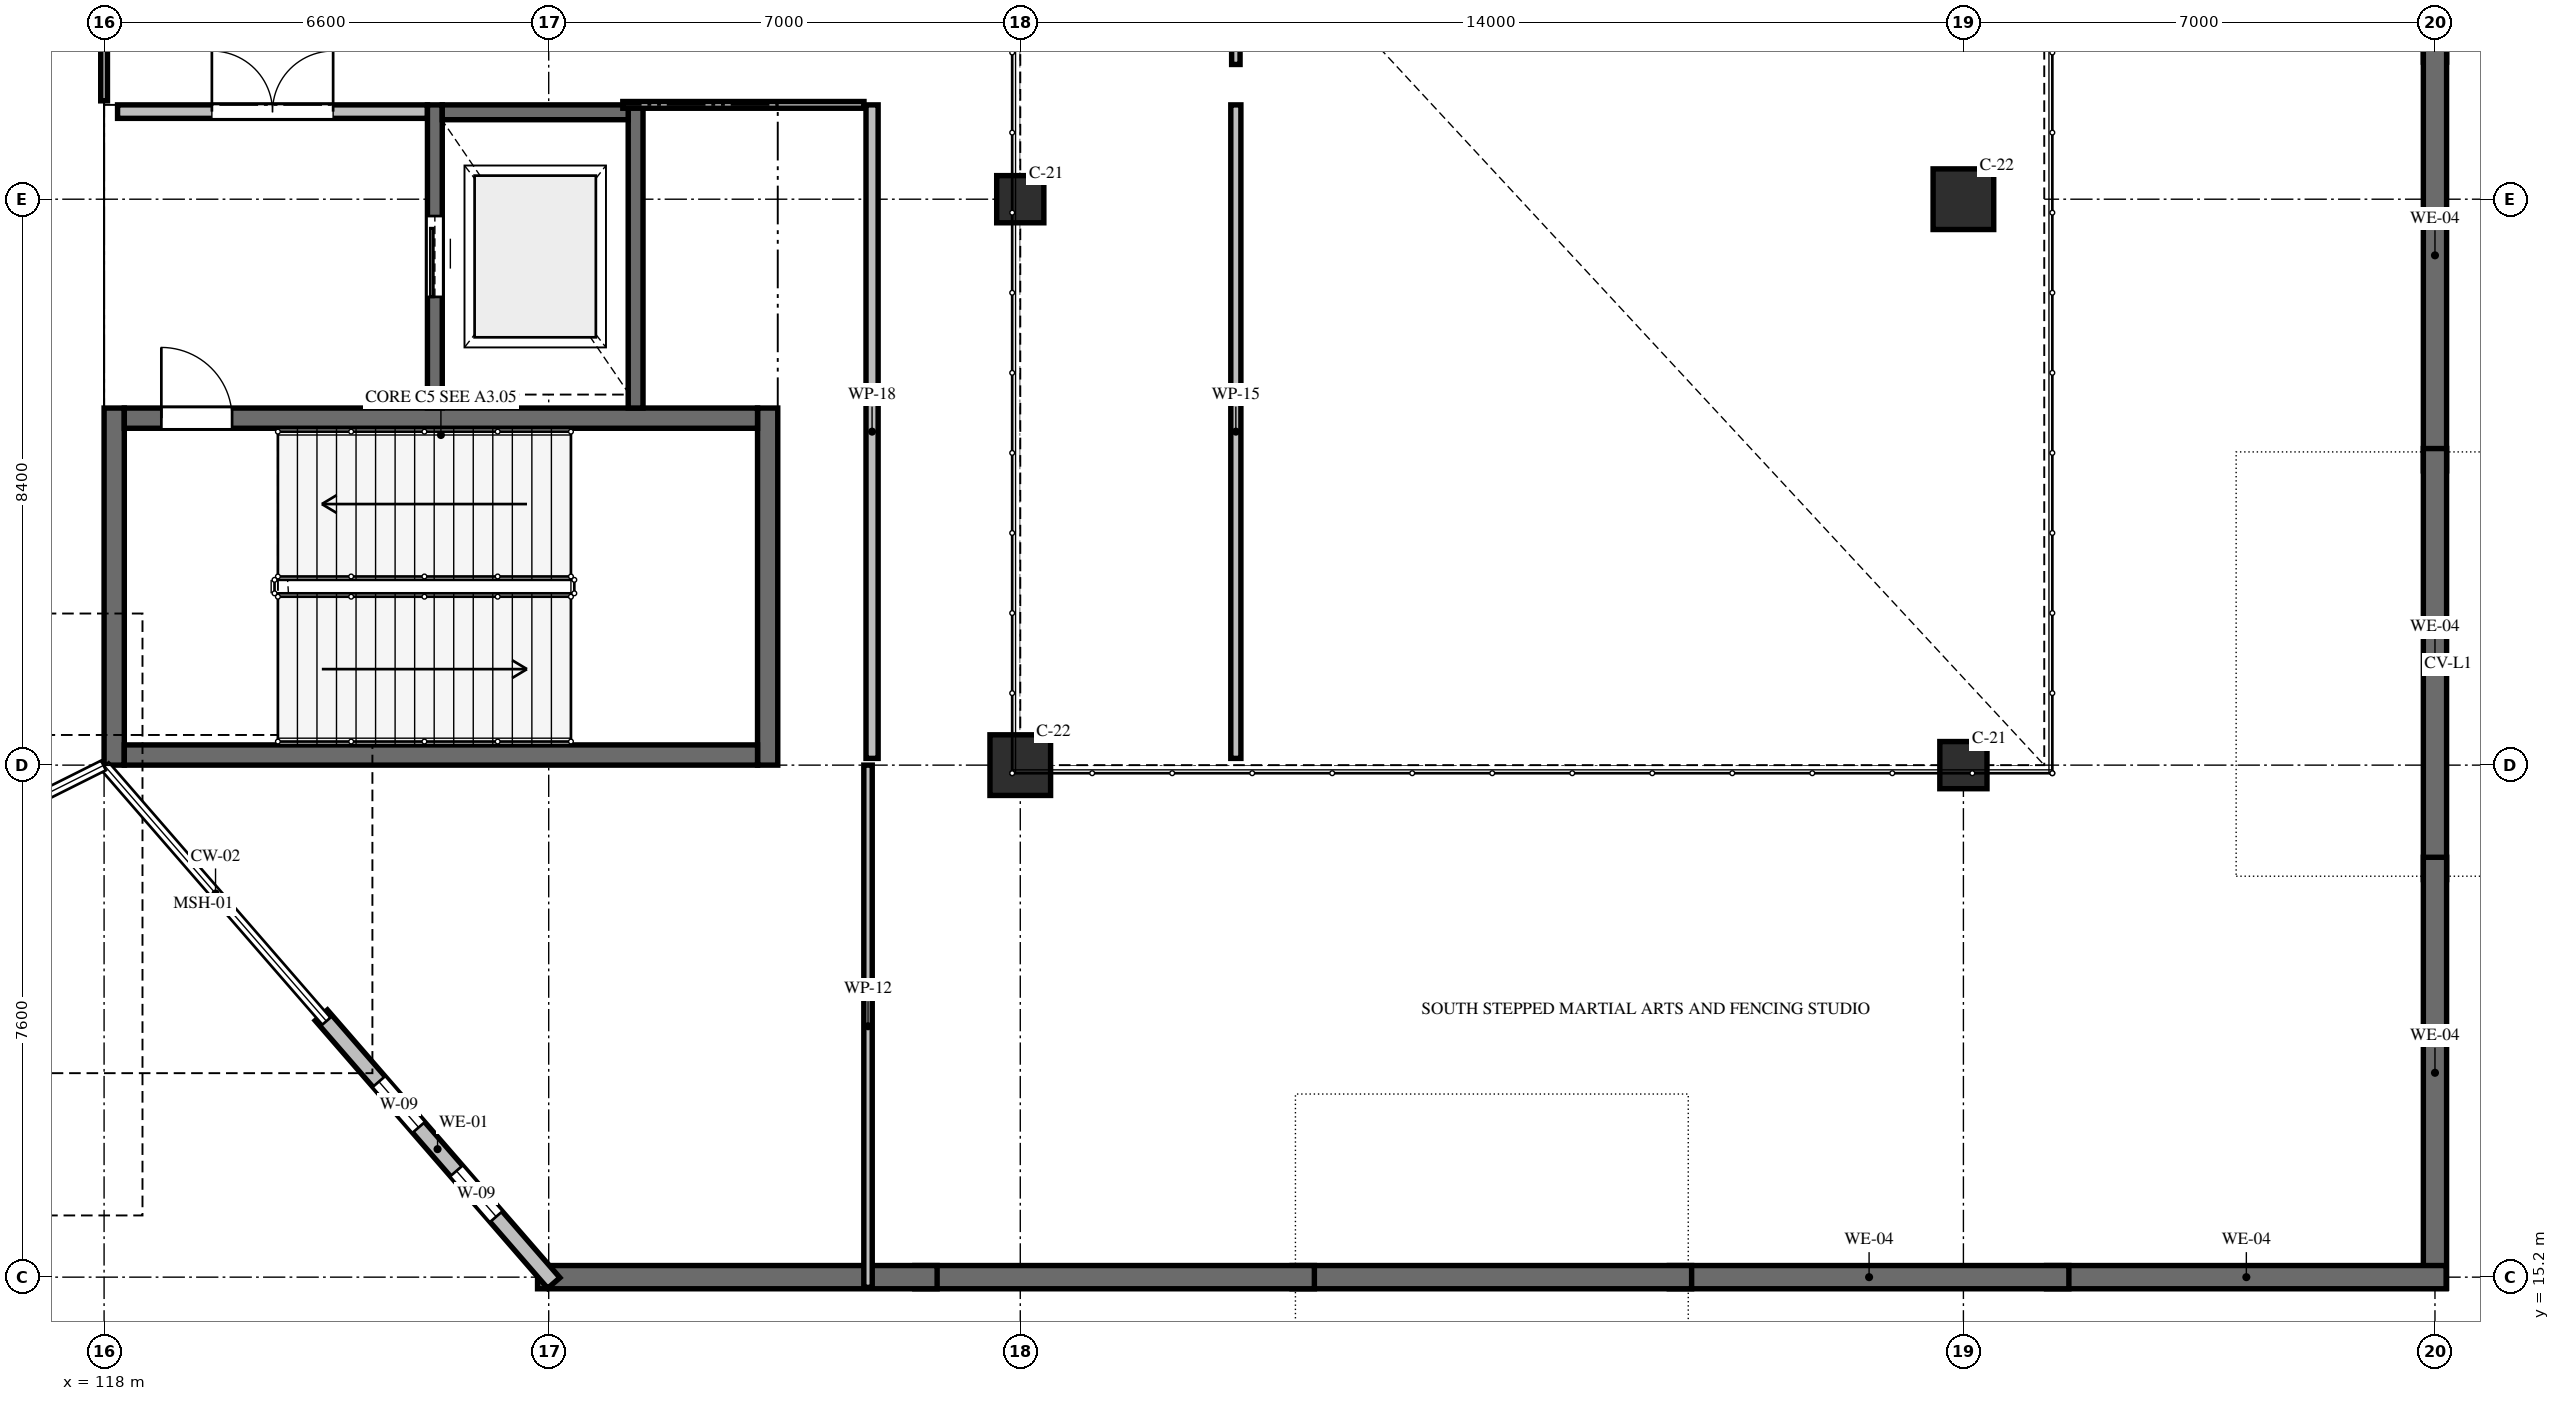
"""IFC4 building model, lengths in metres.
Left out: names, types, materials, properties, quantities, classifications, styles, units other than length and angle.
Written with IfcOpenShell. Run it as: python <this file> out.ifc"""

import sys

from ifc_helpers import new_model, si_unit, direction, frame, frame_2d, origin, origin_2d, place, context, subcontext, project, spatial, rectangle, hollow_rectangle, extrude, element, fill, save


model = new_model("IFC4")
c1 = context("Model", 3, precision=1e-05, world=origin(), true_north=direction((0.0, 1.0)))
c2 = subcontext(c1, "Body", "Model", "MODEL_VIEW")
j1 = project(units=[si_unit("LENGTHUNIT", "METRE"), si_unit("PLANEANGLEUNIT", "RADIAN")], contexts=[c1])
p1 = place(None, origin())
s1 = spatial("IfcSite", under=j1, at=p1, CompositionType="ELEMENT")
p2 = place(p1, origin())
s2 = spatial("IfcBuilding", under=s1, at=p2, CompositionType="ELEMENT")
p3 = place(p2, frame((0.0, 0.0, 5.4)))
s3 = spatial("IfcBuildingStorey", under=s2, at=p3, CompositionType="ELEMENT", Elevation=5.4)
p4 = place(p3, frame((131.6, 22.8, 0.0), z_axis=(0.0, 0.0, 1.0), x_axis=(1.0, 0.0, 0.0)))
e1 = element("IfcColumn", 1, at=p4, inside=s3, PredefinedType="COLUMN", context=c2, shape_type="SweptSolid", body=[
    extrude(hollow_rectangle(XDim=0.9, YDim=0.9, WallThickness=0.036, InnerFilletRadius=0.036, OuterFilletRadius=0.072, at=origin_2d()), origin(), (0.0, 0.0, 1.0), 5.4),
])
for number, where, z_axis, x_axis in (
    (2, (131.6, 31.2, 0.0), (0.0, 0.0, 1.0), (1.0, 0.0, 0.0)),
    (3, (145.6, 22.8, 0.0), (0.0, 0.0, 1.0), (1.0, 0.0, 0.0)),
):
    element("IfcColumn", number, at=place(p3, frame(where, z_axis=z_axis, x_axis=x_axis)), inside=s3, PredefinedType="COLUMN", context=c2, shape_type="SweptSolid", body=[
        extrude(hollow_rectangle(XDim=0.7, YDim=0.7, WallThickness=0.028, InnerFilletRadius=0.028, OuterFilletRadius=0.056, at=origin_2d()), origin(), (0.0, 0.0, 1.0), 5.4),
    ])
p5 = place(p3, frame((145.6, 31.2, 0.0), z_axis=(0.0, 0.0, 1.0), x_axis=(1.0, 0.0, 0.0)))
e4 = element("IfcColumn", 4, at=p5, inside=s3, PredefinedType="COLUMN", context=c2, shape_type="SweptSolid", body=[
    extrude(hollow_rectangle(XDim=0.9, YDim=0.9, WallThickness=0.036, InnerFilletRadius=0.036, OuterFilletRadius=0.072, at=origin_2d()), origin(), (0.0, 0.0, 1.0), 5.4),
])
p6 = place(p3, frame((152.6, 39.632, 0.0), z_axis=(0.0, 0.0, 1.0), x_axis=(0.0, -1.0, 0.0)))
e5 = element("IfcWall", 5, at=p6, inside=s3, PredefinedType="SOLIDWALL", context=c2, shape_type="SweptSolid", body=[
    extrude(rectangle(XDim=6.398, YDim=0.345, at=frame_2d((3.199, 0.0))), origin(), (0.0, 0.0, 1.0), 4.748),
])
p7 = place(p6, frame((1.233, 0.0, 0.9)))
e6 = element("IfcOpeningElement", 6, at=p7, cuts=e5, PredefinedType="OPENING", context=c2, shape_type="SweptSolid", body=[
    extrude(rectangle(XDim=1.8, YDim=1.35, at=frame_2d((0.9, 0.675))), frame((0.0, 0.182, 0.0), z_axis=(0.0, -1.0, 0.0), x_axis=(1.0, 0.0, 0.0)), (0.0, 0.0, 1.0), 0.365),
])
p8 = place(p6, frame((3.365, 0.0, 0.9)))
e7 = element("IfcOpeningElement", 7, at=p8, cuts=e5, PredefinedType="OPENING", context=c2, shape_type="SweptSolid", body=[
    extrude(rectangle(XDim=1.8, YDim=1.35, at=frame_2d((0.9, 0.675))), frame((0.0, 0.182, 0.0), z_axis=(0.0, -1.0, 0.0), x_axis=(1.0, 0.0, 0.0)), (0.0, 0.0, 1.0), 0.365),
])
p9 = place(p3, frame((152.6, 33.566, 0.0), z_axis=(0.0, 0.0, 1.0), x_axis=(0.0, -1.0, 0.0)))
e8 = element("IfcWall", 8, at=p9, inside=s3, PredefinedType="SOLIDWALL", context=c2, shape_type="SweptSolid", body=[
    extrude(rectangle(XDim=6.398, YDim=0.345, at=frame_2d((3.199, 0.0))), origin(), (0.0, 0.0, 1.0), 4.738),
])
p10 = place(p3, frame((152.6, 27.499, 0.0), z_axis=(0.0, 0.0, 1.0), x_axis=(0.0, -1.0, 0.0)))
e9 = element("IfcWall", 9, at=p10, inside=s3, PredefinedType="SOLIDWALL", context=c2, shape_type="SweptSolid", body=[
    extrude(rectangle(XDim=6.398, YDim=0.345, at=frame_2d((3.199, 0.0))), origin(), (0.0, 0.0, 1.0), 4.748),
])
p11 = place(p3, frame((152.6, 21.432, 0.0), z_axis=(0.0, 0.0, 1.0), x_axis=(0.0, -1.0, 0.0)))
e10 = element("IfcWall", 10, at=p11, inside=s3, PredefinedType="SOLIDWALL", context=c2, shape_type="SweptSolid", body=[
    extrude(rectangle(XDim=6.398, YDim=0.345, at=frame_2d((3.199, 0.0))), origin(), (0.0, 0.0, 1.0), 4.55),
])
for number, where, z_axis, x_axis in (
    (11, (152.766, 15.2, 0.0), (0.0, 0.0, 1.0), (-1.0, 0.0, 0.0)),
    (12, (147.166, 15.2, 0.0), (0.0, 0.0, 1.0), (-1.0, 0.0, 0.0)),
    (13, (141.566, 15.2, 0.0), (0.0, 0.0, 1.0), (-1.0, 0.0, 0.0)),
    (14, (135.966, 15.2, 0.0), (0.0, 0.0, 1.0), (-1.0, 0.0, 0.0)),
    (15, (130.365, 15.2, 0.0), (0.0, 0.0, 1.0), (-1.0, 0.0, 0.0)),
):
    element("IfcWall", number, at=place(p3, frame(where, z_axis=z_axis, x_axis=x_axis)), inside=s3, PredefinedType="SOLIDWALL", context=c2, shape_type="SweptSolid", body=[
        extrude(rectangle(XDim=5.931, YDim=0.345, at=frame_2d((2.966, 0.0))), origin(), (0.0, 0.0, 1.0), 4.55),
    ])
p12 = place(p3, frame((124.676, 15.113, 0.0), z_axis=(0.0, 0.0, 1.0), x_axis=(-0.655679000565, 0.755039765985, 0.0)))
e16 = element("IfcWall", 16, at=p12, inside=s3, PredefinedType="SOLIDWALL", context=c2, shape_type="SweptSolid", body=[
    extrude(rectangle(XDim=5.263, YDim=0.24, at=frame_2d((2.632, 0.0))), origin(), (0.0, 0.0, 1.0), 5.1),
])
p13 = place(p12, frame((1.304, 0.0, 0.9)))
e17 = element("IfcOpeningElement", 17, at=p13, cuts=e16, PredefinedType="OPENING", context=c2, shape_type="SweptSolid", body=[
    extrude(rectangle(XDim=0.9, YDim=1.2, at=frame_2d((0.45, 0.6))), frame((0.0, 0.13, 0.0), z_axis=(0.0, -1.0, 0.0), x_axis=(1.0, 0.0, 0.0)), (0.0, 0.0, 1.0), 0.26),
])
p14 = place(p12, frame((3.059, 0.0, 0.9)))
e18 = element("IfcOpeningElement", 18, at=p14, cuts=e16, PredefinedType="OPENING", context=c2, shape_type="SweptSolid", body=[
    extrude(rectangle(XDim=0.9, YDim=1.2, at=frame_2d((0.45, 0.6))), frame((0.0, 0.13, 0.0), z_axis=(0.0, -1.0, 0.0), x_axis=(1.0, 0.0, 0.0)), (0.0, 0.0, 1.0), 0.26),
])
for number, where, z_axis, x_axis in (
    (19, (118.15, 22.8, 0.0), (0.0, 0.0, 1.0), (0.0, 1.0, 0.0)),
    (20, (127.85, 28.1, 0.0), (0.0, 0.0, 1.0), (0.0, -1.0, 0.0)),
):
    element("IfcWall", number, at=place(p3, frame(where, z_axis=z_axis, x_axis=x_axis)), inside=s3, PredefinedType="SHEAR", context=c2, shape_type="SweptSolid", body=[
        extrude(rectangle(XDim=5.3, YDim=0.3, at=frame_2d((2.65, 0.0))), origin(), (0.0, 0.0, 1.0), 5.15),
    ])
p15 = place(p3, frame((127.7, 22.95, 0.0), z_axis=(0.0, 0.0, 1.0), x_axis=(-1.0, 0.0, 0.0)))
e21 = element("IfcWall", 21, at=p15, inside=s3, PredefinedType="SHEAR", context=c2, shape_type="SweptSolid", body=[
    extrude(rectangle(XDim=9.4, YDim=0.3, at=frame_2d((4.7, 0.0))), origin(), (0.0, 0.0, 1.0), 5.15),
])
p16 = place(p3, frame((118.3, 27.95, 0.0), z_axis=(0.0, 0.0, 1.0), x_axis=(1.0, 0.0, 0.0)))
e22 = element("IfcWall", 22, at=p16, inside=s3, PredefinedType="SHEAR", context=c2, shape_type="SweptSolid", body=[
    extrude(rectangle(XDim=9.4, YDim=0.3, at=frame_2d((4.7, 0.0))), origin(), (0.0, 0.0, 1.0), 5.15),
])
p17 = place(p16, frame((0.55, 0.0, 0.0)))
e23 = element("IfcOpeningElement", 23, at=p17, cuts=e22, PredefinedType="OPENING", context=c2, shape_type="SweptSolid", body=[
    extrude(rectangle(XDim=1.05, YDim=2.2, at=frame_2d((0.525, 1.1))), frame((0.0, 0.16, 0.0), z_axis=(0.0, -1.0, 0.0), x_axis=(1.0, 0.0, 0.0)), (0.0, 0.0, 1.0), 0.32),
])
p18 = place(p3, frame((118.2, 32.5, 0.0), z_axis=(0.0, 0.0, 1.0), x_axis=(1.0, 0.0, 0.0)))
e24 = element("IfcWall", 24, at=p18, inside=s3, PredefinedType="SOLIDWALL", context=c2, shape_type="SweptSolid", body=[
    extrude(rectangle(XDim=4.6, YDim=0.2, at=frame_2d((2.3, 0.0))), origin(), (0.0, 0.0, 1.0), 4.552),
])
p19 = place(p18, frame((1.4, 0.0, 0.0)))
e25 = element("IfcOpeningElement", 25, at=p19, cuts=e24, PredefinedType="OPENING", context=c2, shape_type="SweptSolid", body=[
    extrude(rectangle(XDim=1.8, YDim=2.2, at=frame_2d((0.9, 1.1))), frame((0.0, 0.11, 0.0), z_axis=(0.0, -1.0, 0.0), x_axis=(1.0, 0.0, 0.0)), (0.0, 0.0, 1.0), 0.22),
])
p20 = place(p3, frame((122.91, 28.1, 0.0), z_axis=(0.0, 0.0, 1.0), x_axis=(0.0, 1.0, 0.0)))
e26 = element("IfcWall", 26, at=p20, inside=s3, PredefinedType="SOLIDWALL", context=c2, shape_type="SweptSolid", body=[
    extrude(rectangle(XDim=4.5, YDim=0.22, at=frame_2d((2.25, 0.0))), origin(), (0.0, 0.0, 1.0), 5.15),
])
p21 = place(p20, frame((1.65, 0.0, 0.0)))
e27 = element("IfcOpeningElement", 27, at=p21, cuts=e26, PredefinedType="OPENING", context=c2, shape_type="SweptSolid", body=[
    extrude(rectangle(XDim=1.2, YDim=2.2, at=frame_2d((0.6, 1.1))), frame((0.0, 0.12, 0.0), z_axis=(0.0, -1.0, 0.0), x_axis=(1.0, 0.0, 0.0)), (0.0, 0.0, 1.0), 0.24),
])
p22 = place(p3, frame((125.89, 28.1, 0.0), z_axis=(0.0, 0.0, 1.0), x_axis=(0.0, 1.0, 0.0)))
e28 = element("IfcWall", 28, at=p22, inside=s3, PredefinedType="SOLIDWALL", context=c2, shape_type="SweptSolid", body=[
    extrude(rectangle(XDim=4.5, YDim=0.22, at=frame_2d((2.25, 0.0))), origin(), (0.0, 0.0, 1.0), 5.15),
])
p23 = place(p3, frame((123.02, 32.49, 0.0), z_axis=(0.0, 0.0, 1.0), x_axis=(1.0, 0.0, 0.0)))
e29 = element("IfcWall", 29, at=p23, inside=s3, PredefinedType="SOLIDWALL", context=c2, shape_type="SweptSolid", body=[
    extrude(rectangle(XDim=2.76, YDim=0.22, at=frame_2d((1.38, 0.0))), origin(), (0.0, 0.0, 1.0), 5.15),
])
p24 = place(p3, frame((129.34, 15.049, 0.0), z_axis=(0.0, 0.0, 1.0), x_axis=(0.0, 1.0, 0.0)))
e30 = element("IfcWall", 30, at=p24, inside=s3, PredefinedType="PARTITIONING", context=c2, shape_type="SweptSolid", body=[
    extrude(rectangle(XDim=7.751, YDim=0.125, at=frame_2d((3.876, 0.0))), origin(), (0.0, 0.0, 1.0), 4.552),
])
p25 = place(p3, frame((118.0, 36.08, 0.0), z_axis=(0.0, 0.0, 1.0), x_axis=(0.0, -1.0, 0.0)))
e31 = element("IfcWall", 31, at=p25, inside=s3, PredefinedType="PARTITIONING", context=c2, shape_type="SweptSolid", body=[
    extrude(rectangle(XDim=3.42, YDim=0.1, at=frame_2d((1.71, 0.0))), origin(), (0.0, 0.0, 1.0), 5.05),
])
p26 = place(p25, frame((0.91, 0.0, 0.0)))
e32 = element("IfcOpeningElement", 32, at=p26, cuts=e31, PredefinedType="OPENING", context=c2, shape_type="SweptSolid", body=[
    extrude(rectangle(XDim=1.6, YDim=2.2, at=frame_2d((0.8, 1.1))), frame((0.0, 0.06, 0.0), z_axis=(0.0, -1.0, 0.0), x_axis=(1.0, 0.0, 0.0)), (0.0, 0.0, 1.0), 0.12),
])
p27 = place(p3, frame((134.8, 36.4, 0.0), z_axis=(0.0, 0.0, 1.0), x_axis=(0.0, -1.0, 0.0)))
e33 = element("IfcWall", 33, at=p27, inside=s3, PredefinedType="PARTITIONING", context=c2, shape_type="SweptSolid", body=[
    extrude(rectangle(XDim=3.2, YDim=0.125, at=frame_2d((1.6, 0.0))), origin(), (0.0, 0.0, 1.0), 5.05),
])
p28 = place(p3, frame((134.8, 32.6, 0.0), z_axis=(0.0, 0.0, 1.0), x_axis=(0.0, -1.0, 0.0)))
e34 = element("IfcWall", 34, at=p28, inside=s3, PredefinedType="PARTITIONING", context=c2, shape_type="SweptSolid", body=[
    extrude(rectangle(XDim=9.7, YDim=0.15, at=frame_2d((4.85, 0.0))), origin(), (0.0, 0.0, 1.0), 3.47),
])
p29 = place(p3, frame((129.4, 22.9, 0.0), z_axis=(0.0, 0.0, 1.0), x_axis=(0.0, 1.0, 0.0)))
e35 = element("IfcWall", 35, at=p29, inside=s3, PredefinedType="PARTITIONING", context=c2, shape_type="SweptSolid", body=[
    extrude(rectangle(XDim=9.7, YDim=0.18, at=frame_2d((4.85, 0.0))), origin(), (0.0, 0.0, 1.0), 4.552),
])
p30 = place(p3, frame((129.28, 32.6, 0.0), z_axis=(0.0, 0.0, 1.0), x_axis=(-1.0, 0.0, 0.0)))
e36 = element("IfcWall", 36, at=p30, inside=s3, PredefinedType="PARTITIONING", context=c2, shape_type="SweptSolid", body=[
    extrude(rectangle(XDim=3.58, YDim=0.1, at=frame_2d((1.79, 0.0))), origin(), (0.0, 0.0, 1.0), 5.05),
])
p31 = place(p13, origin())
e37 = element("IfcWindow", 37, at=p31, inside=s3, PartitioningType="SINGLE_PANEL", PredefinedType="WINDOW", context=c2, shape_type="SweptSolid", body=[
    extrude(rectangle(XDim=0.9, YDim=1.2, at=frame_2d((0.45, 0.6))), frame((0.0, 0.03, 0.0), z_axis=(0.0, -1.0, 0.0), x_axis=(1.0, 0.0, 0.0)), (0.0, 0.0, 1.0), 0.06),
])
fill(e17, e37)
p32 = place(p14, origin())
e38 = element("IfcWindow", 38, at=p32, inside=s3, PartitioningType="SINGLE_PANEL", PredefinedType="WINDOW", context=c2, shape_type="SweptSolid", body=[
    extrude(rectangle(XDim=0.9, YDim=1.2, at=frame_2d((0.45, 0.6))), frame((0.0, 0.03, 0.0), z_axis=(0.0, -1.0, 0.0), x_axis=(1.0, 0.0, 0.0)), (0.0, 0.0, 1.0), 0.06),
])
fill(e18, e38)
p33 = place(p17, origin())
e39 = element("IfcDoor", 39, at=p33, inside=s3, OperationType="SINGLE_SWING_LEFT", PredefinedType="DOOR", context=c2, shape_type="SweptSolid", body=[
    extrude(rectangle(XDim=1.05, YDim=2.2, at=frame_2d((0.525, 1.1))), frame((0.0, 0.025, 0.0), z_axis=(0.0, -1.0, 0.0), x_axis=(1.0, 0.0, 0.0)), (0.0, 0.0, 1.0), 0.05),
])
fill(e23, e39)
p34 = place(p19, origin())
e40 = element("IfcDoor", 40, at=p34, inside=s3, OperationType="DOUBLE_DOOR_SINGLE_SWING", PredefinedType="DOOR", context=c2, shape_type="SweptSolid", body=[
    extrude(rectangle(XDim=1.8, YDim=2.2, at=frame_2d((0.9, 1.1))), frame((0.0, 0.025, 0.0), z_axis=(0.0, -1.0, 0.0), x_axis=(1.0, 0.0, 0.0)), (0.0, 0.0, 1.0), 0.05),
])
fill(e25, e40)
p35 = place(p21, origin())
e41 = element("IfcDoor", 41, at=p35, inside=s3, OperationType="SLIDING_TO_LEFT", PredefinedType="DOOR", context=c2, shape_type="SweptSolid", body=[
    extrude(rectangle(XDim=1.2, YDim=2.2, at=frame_2d((0.6, 1.1))), frame((0.0, 0.025, 0.0), z_axis=(0.0, -1.0, 0.0), x_axis=(1.0, 0.0, 0.0)), (0.0, 0.0, 1.0), 0.05),
])
fill(e27, e41)
save(model, sys.argv[1])
